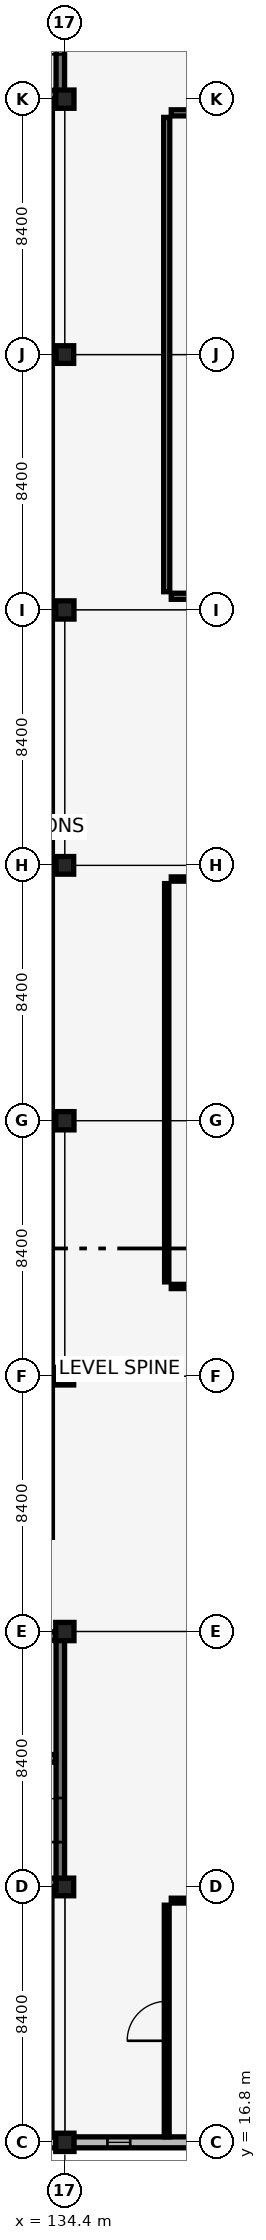
"""IFC4 building model, lengths in metres.
Left out: names, types, materials, properties, quantities, classifications, styles, units other than length and angle.
Written with IfcOpenShell. Run it as: python <this file> out.ifc"""

import sys

from ifc_helpers import new_model, si_unit, direction, frame, frame_2d, origin, origin_2d, place, context, subcontext, project, spatial, rectangle, extrude, element, fill, save


model = new_model("IFC4")
c1 = context("Model", 3, precision=1e-05, world=origin(), true_north=direction((0.0, 1.0)))
c2 = subcontext(c1, "Body", "Model", "MODEL_VIEW")
j1 = project(units=[si_unit("LENGTHUNIT", "METRE"), si_unit("PLANEANGLEUNIT", "RADIAN")], contexts=[c1])
p1 = place(None, origin())
s1 = spatial("IfcSite", under=j1, at=p1, CompositionType="ELEMENT")
p2 = place(p1, origin())
s2 = spatial("IfcBuilding", under=s1, at=p2, CompositionType="ELEMENT")
p3 = place(p2, frame((0.0, 0.0, 18.02)))
s3 = spatial("IfcBuildingStorey", under=s2, at=p3, CompositionType="ELEMENT", Elevation=18.02)
p4 = place(p3, frame((126.15, 25.35, 0.0), z_axis=(0.0, 0.0, 1.0), x_axis=(1.0, 0.0, 0.0)))
e1 = element("IfcWall", 1, at=p4, inside=s3, PredefinedType="SHEAR", context=c2, shape_type="SweptSolid", body=[
    extrude(rectangle(XDim=8.1, YDim=0.28, at=frame_2d((4.05, 0.0))), origin(), (0.0, 0.0, 1.0), 3.78),
])
p5 = place(p4, frame((0.485, 0.0, 0.0)))
e2 = element("IfcOpeningElement", 2, at=p5, cuts=e1, PredefinedType="OPENING", context=c2, shape_type="SweptSolid", body=[
    extrude(rectangle(XDim=1.0, YDim=2.15, at=frame_2d((0.5, 1.075))), frame((0.0, 0.15, 0.0), z_axis=(0.0, -1.0, 0.0), x_axis=(1.0, 0.0, 0.0)), (0.0, 0.0, 1.0), 0.3),
])
p6 = place(p3, frame((126.15, 33.45, 0.0), z_axis=(0.0, 0.0, 1.0), x_axis=(1.0, 0.0, 0.0)))
e3 = element("IfcWall", 3, at=p6, inside=s3, PredefinedType="SHEAR", context=c2, shape_type="SweptSolid", body=[
    extrude(rectangle(XDim=8.1, YDim=0.28, at=frame_2d((4.05, 0.0))), origin(), (0.0, 0.0, 1.0), 3.78),
])
p7 = place(p3, frame((134.25, 25.35, 0.0), z_axis=(0.0, 0.0, 1.0), x_axis=(0.0, 1.0, 0.0)))
e4 = element("IfcWall", 4, at=p7, inside=s3, PredefinedType="SHEAR", context=c2, shape_type="SweptSolid", body=[
    extrude(rectangle(XDim=8.1, YDim=0.28, at=frame_2d((4.05, 0.0))), origin(), (0.0, 0.0, 1.0), 3.78),
])
p8 = place(p7, frame((1.325, 0.0, 0.0)))
e5 = element("IfcOpeningElement", 5, at=p8, cuts=e4, PredefinedType="OPENING", context=c2, shape_type="SweptSolid", body=[
    extrude(rectangle(XDim=1.45, YDim=2.15, at=frame_2d((0.725, 1.075))), frame((0.0, 0.15, 0.0), z_axis=(0.0, -1.0, 0.0), x_axis=(1.0, 0.0, 0.0)), (0.0, 0.0, 1.0), 0.3),
])
p9 = place(p3, frame((126.3, 29.43, 0.0), z_axis=(0.0, 0.0, 1.0), x_axis=(1.0, 0.0, 0.0)))
e6 = element("IfcWall", 6, at=p9, inside=s3, PredefinedType="SHEAR", context=c2, shape_type="SweptSolid", body=[
    extrude(rectangle(XDim=7.8, YDim=0.25, at=frame_2d((3.9, 0.0))), origin(), (0.0, 0.0, 1.0), 3.78),
])
p10 = place(p9, frame((6.2, 0.0, 0.0)))
e7 = element("IfcOpeningElement", 7, at=p10, cuts=e6, PredefinedType="OPENING", context=c2, shape_type="SweptSolid", body=[
    extrude(rectangle(XDim=1.35, YDim=2.15, at=frame_2d((0.675, 1.075))), frame((0.0, 0.135, 0.0), z_axis=(0.0, -1.0, 0.0), x_axis=(1.0, 0.0, 0.0)), (0.0, 0.0, 1.0), 0.27),
])
p11 = place(p3, frame((126.15, 84.15, 0.0), z_axis=(0.0, 0.0, 1.0), x_axis=(1.0, 0.0, 0.0)))
e8 = element("IfcWall", 8, at=p11, inside=s3, PredefinedType="SHEAR", context=c2, shape_type="SweptSolid", body=[
    extrude(rectangle(XDim=8.1, YDim=0.28, at=frame_2d((4.05, 0.0))), origin(), (0.0, 0.0, 1.0), 3.78),
])
p12 = place(p11, frame((0.485, 0.0, 0.0)))
e9 = element("IfcOpeningElement", 9, at=p12, cuts=e8, PredefinedType="OPENING", context=c2, shape_type="SweptSolid", body=[
    extrude(rectangle(XDim=1.0, YDim=2.15, at=frame_2d((0.5, 1.075))), frame((0.0, 0.15, 0.0), z_axis=(0.0, -1.0, 0.0), x_axis=(1.0, 0.0, 0.0)), (0.0, 0.0, 1.0), 0.3),
])
p13 = place(p3, frame((134.25, 84.15, 0.0), z_axis=(0.0, 0.0, 1.0), x_axis=(0.0, 1.0, 0.0)))
e10 = element("IfcWall", 10, at=p13, inside=s3, PredefinedType="SHEAR", context=c2, shape_type="SweptSolid", body=[
    extrude(rectangle(XDim=8.1, YDim=0.28, at=frame_2d((4.05, 0.0))), origin(), (0.0, 0.0, 1.0), 3.78),
])
p14 = place(p13, frame((1.325, 0.0, 0.0)))
e11 = element("IfcOpeningElement", 11, at=p14, cuts=e10, PredefinedType="OPENING", context=c2, shape_type="SweptSolid", body=[
    extrude(rectangle(XDim=1.45, YDim=2.15, at=frame_2d((0.725, 1.075))), frame((0.0, 0.15, 0.0), z_axis=(0.0, -1.0, 0.0), x_axis=(1.0, 0.0, 0.0)), (0.0, 0.0, 1.0), 0.3),
])
p15 = place(p3, frame((134.4, 16.8, 0.0), z_axis=(0.0, 0.0, 1.0), x_axis=(1.0, 0.0, 0.0)))
e12 = element("IfcColumn", 12, at=p15, inside=s3, PredefinedType="COLUMN", context=c2, shape_type="SweptSolid", body=[
    extrude(rectangle(XDim=0.6, YDim=0.6, at=origin_2d()), origin(), (0.0, 0.0, 1.0), 3.78),
])
p16 = place(p3, frame((134.4, 25.2, 0.0), z_axis=(0.0, 0.0, 1.0), x_axis=(1.0, 0.0, 0.0)))
e13 = element("IfcColumn", 13, at=p16, inside=s3, PredefinedType="COLUMN", context=c2, shape_type="SweptSolid", body=[
    extrude(rectangle(XDim=0.58, YDim=0.58, at=origin_2d()), origin(), (0.0, 0.0, 1.0), 3.78),
])
p17 = place(p3, frame((134.4, 33.6, 0.0), z_axis=(0.0, 0.0, 1.0), x_axis=(1.0, 0.0, 0.0)))
e14 = element("IfcColumn", 14, at=p17, inside=s3, PredefinedType="COLUMN", context=c2, shape_type="SweptSolid", body=[
    extrude(rectangle(XDim=0.6, YDim=0.6, at=origin_2d()), origin(), (0.0, 0.0, 1.0), 3.78),
])
p18 = place(p3, frame((134.4, 42.0, 0.0), z_axis=(0.0, 0.0, 1.0), x_axis=(1.0, 0.0, 0.0)))
e15 = element("IfcColumn", 15, at=p18, inside=s3, PredefinedType="COLUMN", context=c2, shape_type="SweptSolid", body=[
    extrude(rectangle(XDim=0.58, YDim=0.58, at=origin_2d()), origin(), (0.0, 0.0, 1.0), 3.78),
])
p19 = place(p3, frame((134.4, 50.4, 0.0), z_axis=(0.0, 0.0, 1.0), x_axis=(1.0, 0.0, 0.0)))
e16 = element("IfcColumn", 16, at=p19, inside=s3, PredefinedType="COLUMN", context=c2, shape_type="SweptSolid", body=[
    extrude(rectangle(XDim=0.6, YDim=0.6, at=origin_2d()), origin(), (0.0, 0.0, 1.0), 3.78),
])
p20 = place(p3, frame((134.4, 58.8, 0.0), z_axis=(0.0, 0.0, 1.0), x_axis=(1.0, 0.0, 0.0)))
e17 = element("IfcColumn", 17, at=p20, inside=s3, PredefinedType="COLUMN", context=c2, shape_type="SweptSolid", body=[
    extrude(rectangle(XDim=0.58, YDim=0.58, at=origin_2d()), origin(), (0.0, 0.0, 1.0), 3.78),
])
p21 = place(p3, frame((134.4, 67.2, 0.0), z_axis=(0.0, 0.0, 1.0), x_axis=(1.0, 0.0, 0.0)))
e18 = element("IfcColumn", 18, at=p21, inside=s3, PredefinedType="COLUMN", context=c2, shape_type="SweptSolid", body=[
    extrude(rectangle(XDim=0.6, YDim=0.6, at=origin_2d()), origin(), (0.0, 0.0, 1.0), 3.78),
])
p22 = place(p3, frame((134.4, 75.6, 0.0), z_axis=(0.0, 0.0, 1.0), x_axis=(1.0, 0.0, 0.0)))
e19 = element("IfcColumn", 19, at=p22, inside=s3, PredefinedType="COLUMN", context=c2, shape_type="SweptSolid", body=[
    extrude(rectangle(XDim=0.58, YDim=0.58, at=origin_2d()), origin(), (0.0, 0.0, 1.0), 3.78),
])
p23 = place(p3, frame((134.4, 84.0, 0.0), z_axis=(0.0, 0.0, 1.0), x_axis=(1.0, 0.0, 0.0)))
e20 = element("IfcColumn", 20, at=p23, inside=s3, PredefinedType="COLUMN", context=c2, shape_type="SweptSolid", body=[
    extrude(rectangle(XDim=0.6, YDim=0.6, at=origin_2d()), origin(), (0.0, 0.0, 1.0), 3.78),
])
p24 = place(p3, frame((126.275, 16.8, 0.0), z_axis=(0.0, 0.0, 1.0), x_axis=(1.0, 0.0, 0.0)))
e21 = element("IfcWall", 21, at=p24, inside=s3, PredefinedType="SOLIDWALL", context=c2, shape_type="SweptSolid", body=[
    extrude(rectangle(XDim=7.84, YDim=0.36, at=frame_2d((3.92, 0.0))), origin(), (0.0, 0.0, 1.0), 3.18),
])
p25 = place(p24, frame((1.115, 0.0, 0.7)))
e22 = element("IfcOpeningElement", 22, at=p25, cuts=e21, PredefinedType="OPENING", context=c2, shape_type="SweptSolid", body=[
    extrude(rectangle(XDim=0.75, YDim=2.1, at=frame_2d((0.375, 1.05))), frame((0.0, 0.19, 0.0), z_axis=(0.0, -1.0, 0.0), x_axis=(1.0, 0.0, 0.0)), (0.0, 0.0, 1.0), 0.38),
])
p26 = place(p24, frame((2.683, 0.0, 0.7)))
e23 = element("IfcOpeningElement", 23, at=p26, cuts=e21, PredefinedType="OPENING", context=c2, shape_type="SweptSolid", body=[
    extrude(rectangle(XDim=0.75, YDim=2.1, at=frame_2d((0.375, 1.05))), frame((0.0, 0.19, 0.0), z_axis=(0.0, -1.0, 0.0), x_axis=(1.0, 0.0, 0.0)), (0.0, 0.0, 1.0), 0.38),
])
p27 = place(p24, frame((4.407, 0.0, 0.7)))
e24 = element("IfcOpeningElement", 24, at=p27, cuts=e21, PredefinedType="OPENING", context=c2, shape_type="SweptSolid", body=[
    extrude(rectangle(XDim=0.75, YDim=2.1, at=frame_2d((0.375, 1.05))), frame((0.0, 0.19, 0.0), z_axis=(0.0, -1.0, 0.0), x_axis=(1.0, 0.0, 0.0)), (0.0, 0.0, 1.0), 0.38),
])
p28 = place(p24, frame((5.975, 0.0, 0.7)))
e25 = element("IfcOpeningElement", 25, at=p28, cuts=e21, PredefinedType="OPENING", context=c2, shape_type="SweptSolid", body=[
    extrude(rectangle(XDim=0.75, YDim=2.1, at=frame_2d((0.375, 1.05))), frame((0.0, 0.19, 0.0), z_axis=(0.0, -1.0, 0.0), x_axis=(1.0, 0.0, 0.0)), (0.0, 0.0, 1.0), 0.38),
])
p29 = place(p3, frame((134.685, 16.8, 0.0), z_axis=(0.0, 0.0, 1.0), x_axis=(1.0, 0.0, 0.0)))
e26 = element("IfcWall", 26, at=p29, inside=s3, PredefinedType="SOLIDWALL", context=c2, shape_type="SweptSolid", body=[
    extrude(rectangle(XDim=7.84, YDim=0.36, at=frame_2d((3.92, 0.0))), origin(), (0.0, 0.0, 1.0), 3.18),
])
p30 = place(p29, frame((1.115, 0.0, 0.7)))
e27 = element("IfcOpeningElement", 27, at=p30, cuts=e26, PredefinedType="OPENING", context=c2, shape_type="SweptSolid", body=[
    extrude(rectangle(XDim=0.75, YDim=2.1, at=frame_2d((0.375, 1.05))), frame((0.0, 0.19, 0.0), z_axis=(0.0, -1.0, 0.0), x_axis=(1.0, 0.0, 0.0)), (0.0, 0.0, 1.0), 0.38),
])
p31 = place(p29, frame((4.407, 0.0, 0.7)))
e28 = element("IfcOpeningElement", 28, at=p31, cuts=e26, PredefinedType="OPENING", context=c2, shape_type="SweptSolid", body=[
    extrude(rectangle(XDim=0.75, YDim=2.1, at=frame_2d((0.375, 1.05))), frame((0.0, 0.19, 0.0), z_axis=(0.0, -1.0, 0.0), x_axis=(1.0, 0.0, 0.0)), (0.0, 0.0, 1.0), 0.38),
])
p32 = place(p29, frame((5.975, 0.0, 0.7)))
e29 = element("IfcOpeningElement", 29, at=p32, cuts=e26, PredefinedType="OPENING", context=c2, shape_type="SweptSolid", body=[
    extrude(rectangle(XDim=0.75, YDim=2.1, at=frame_2d((0.375, 1.05))), frame((0.0, 0.19, 0.0), z_axis=(0.0, -1.0, 0.0), x_axis=(1.0, 0.0, 0.0)), (0.0, 0.0, 1.0), 0.38),
])
p33 = place(p3, frame((137.75, 16.98, 0.0), z_axis=(0.0, 0.0, 1.0), x_axis=(0.0, 1.0, 0.0)))
e30 = element("IfcWall", 30, at=p33, inside=s3, PredefinedType="PARTITIONING", context=c2, shape_type="SweptSolid", body=[
    extrude(rectangle(XDim=7.62, YDim=0.16, at=frame_2d((3.81, 0.0))), origin(), (0.0, 0.0, 1.0), 3.18),
])
p34 = place(p33, frame((3.16, 0.0, 0.0)))
e31 = element("IfcOpeningElement", 31, at=p34, cuts=e30, PredefinedType="OPENING", context=c2, shape_type="SweptSolid", body=[
    extrude(rectangle(XDim=1.3, YDim=2.2, at=frame_2d((0.65, 1.1))), frame((0.0, 0.09, 0.0), z_axis=(0.0, -1.0, 0.0), x_axis=(1.0, 0.0, 0.0)), (0.0, 0.0, 1.0), 0.18),
])
p35 = place(p3, frame((137.9, 24.75, 0.0), z_axis=(0.0, 0.0, 1.0), x_axis=(1.0, 0.0, 0.0)))
e32 = element("IfcWall", 32, at=p35, inside=s3, PredefinedType="PARTITIONING", context=c2, shape_type="SweptSolid", body=[
    extrude(rectangle(XDim=29.92, YDim=0.16, at=frame_2d((14.96, 0.0))), origin(), (0.0, 0.0, 1.0), 3.13),
])
p36 = place(p3, frame((137.9, 44.95, 0.0), z_axis=(0.0, 0.0, 1.0), x_axis=(1.0, 0.0, 0.0)))
e33 = element("IfcWall", 33, at=p36, inside=s3, PredefinedType="PARTITIONING", context=c2, shape_type="SweptSolid", body=[
    extrude(rectangle(XDim=12.65, YDim=0.14, at=frame_2d((6.325, 0.0))), origin(), (0.0, 0.0, 1.0), 3.38),
])
p37 = place(p36, frame((5.85, 0.0, 0.0)))
e34 = element("IfcOpeningElement", 34, at=p37, cuts=e33, PredefinedType="OPENING", context=c2, shape_type="SweptSolid", body=[
    extrude(rectangle(XDim=0.95, YDim=2.1, at=frame_2d((0.475, 1.05))), frame((0.0, 0.08, 0.0), z_axis=(0.0, -1.0, 0.0), x_axis=(1.0, 0.0, 0.0)), (0.0, 0.0, 1.0), 0.16),
])
p38 = place(p3, frame((137.75, 45.1, 0.0), z_axis=(0.0, 0.0, 1.0), x_axis=(0.0, 1.0, 0.0)))
e35 = element("IfcWall", 35, at=p38, inside=s3, PredefinedType="PARTITIONING", context=c2, shape_type="SweptSolid", body=[
    extrude(rectangle(XDim=13.1, YDim=0.14, at=frame_2d((6.55, 0.0))), origin(), (0.0, 0.0, 1.0), 3.08),
])
p39 = place(p3, frame((137.9, 58.35, 0.0), z_axis=(0.0, 0.0, 1.0), x_axis=(1.0, 0.0, 0.0)))
e36 = element("IfcWall", 36, at=p39, inside=s3, PredefinedType="PARTITIONING", context=c2, shape_type="SweptSolid", body=[
    extrude(rectangle(XDim=12.65, YDim=0.14, at=frame_2d((6.325, 0.0))), origin(), (0.0, 0.0, 1.0), 3.38),
])
p40 = place(p3, frame((137.9, 83.55, 0.0), z_axis=(0.0, 0.0, 1.0), x_axis=(1.0, 0.0, 0.0)))
e37 = element("IfcWall", 37, at=p40, inside=s3, PredefinedType="PARTITIONING", context=c2, shape_type="SweptSolid", body=[
    extrude(rectangle(XDim=13.27, YDim=0.2, at=frame_2d((6.635, 0.0))), origin(), (0.0, 0.0, 1.0), 3.13),
])
p41 = place(p40, frame((5.885, 0.0, 0.0)))
e38 = element("IfcOpeningElement", 38, at=p41, cuts=e37, PredefinedType="OPENING", context=c2, shape_type="SweptSolid", body=[
    extrude(rectangle(XDim=1.5, YDim=2.2, at=frame_2d((0.75, 1.1))), frame((0.0, 0.11, 0.0), z_axis=(0.0, -1.0, 0.0), x_axis=(1.0, 0.0, 0.0)), (0.0, 0.0, 1.0), 0.22),
])
p42 = place(p3, frame((137.75, 67.8, 0.0), z_axis=(0.0, 0.0, 1.0), x_axis=(0.0, 1.0, 0.0)))
e39 = element("IfcWall", 39, at=p42, inside=s3, PredefinedType="PARTITIONING", context=c2, shape_type="SweptSolid", body=[
    extrude(rectangle(XDim=15.6, YDim=0.2, at=frame_2d((7.8, 0.0))), origin(), (0.0, 0.0, 1.0), 3.16),
])
p43 = place(p3, frame((137.9, 67.65, 0.0), z_axis=(0.0, 0.0, 1.0), x_axis=(1.0, 0.0, 0.0)))
e40 = element("IfcWall", 40, at=p43, inside=s3, PredefinedType="PARTITIONING", context=c2, shape_type="SweptSolid", body=[
    extrude(rectangle(XDim=12.65, YDim=0.2, at=frame_2d((6.325, 0.0))), origin(), (0.0, 0.0, 1.0), 3.38),
])
p44 = place(p30, origin())
e41 = element("IfcWindow", 41, at=p44, inside=s3, PartitioningType="DOUBLE_PANEL_VERTICAL", PredefinedType="WINDOW", context=c2, shape_type="SweptSolid", body=[
    extrude(rectangle(XDim=0.75, YDim=2.1, at=frame_2d((0.375, 1.05))), frame((0.0, 0.03, 0.0), z_axis=(0.0, -1.0, 0.0), x_axis=(1.0, 0.0, 0.0)), (0.0, 0.0, 1.0), 0.06),
])
fill(e27, e41)
p45 = place(p8, origin())
e42 = element("IfcDoor", 42, at=p45, inside=s3, OperationType="DOUBLE_DOOR_SINGLE_SWING", PredefinedType="DOOR", context=c2, shape_type="SweptSolid", body=[
    extrude(rectangle(XDim=1.45, YDim=2.15, at=frame_2d((0.725, 1.075))), frame((0.0, 0.025, 0.0), z_axis=(0.0, -1.0, 0.0), x_axis=(1.0, 0.0, 0.0)), (0.0, 0.0, 1.0), 0.05),
])
fill(e5, e42)
p46 = place(p14, origin())
e43 = element("IfcDoor", 43, at=p46, inside=s3, OperationType="DOUBLE_DOOR_SINGLE_SWING", PredefinedType="DOOR", context=c2, shape_type="SweptSolid", body=[
    extrude(rectangle(XDim=1.45, YDim=2.15, at=frame_2d((0.725, 1.075))), frame((0.0, 0.025, 0.0), z_axis=(0.0, -1.0, 0.0), x_axis=(1.0, 0.0, 0.0)), (0.0, 0.0, 1.0), 0.05),
])
fill(e11, e43)
p47 = place(p34, origin())
e44 = element("IfcDoor", 44, at=p47, inside=s3, OperationType="SINGLE_SWING_LEFT", PredefinedType="DOOR", context=c2, shape_type="SweptSolid", body=[
    extrude(rectangle(XDim=1.3, YDim=2.2, at=frame_2d((0.65, 1.1))), frame((0.0, 0.025, 0.0), z_axis=(0.0, -1.0, 0.0), x_axis=(1.0, 0.0, 0.0)), (0.0, 0.0, 1.0), 0.05),
])
fill(e31, e44)
save(model, sys.argv[1])
